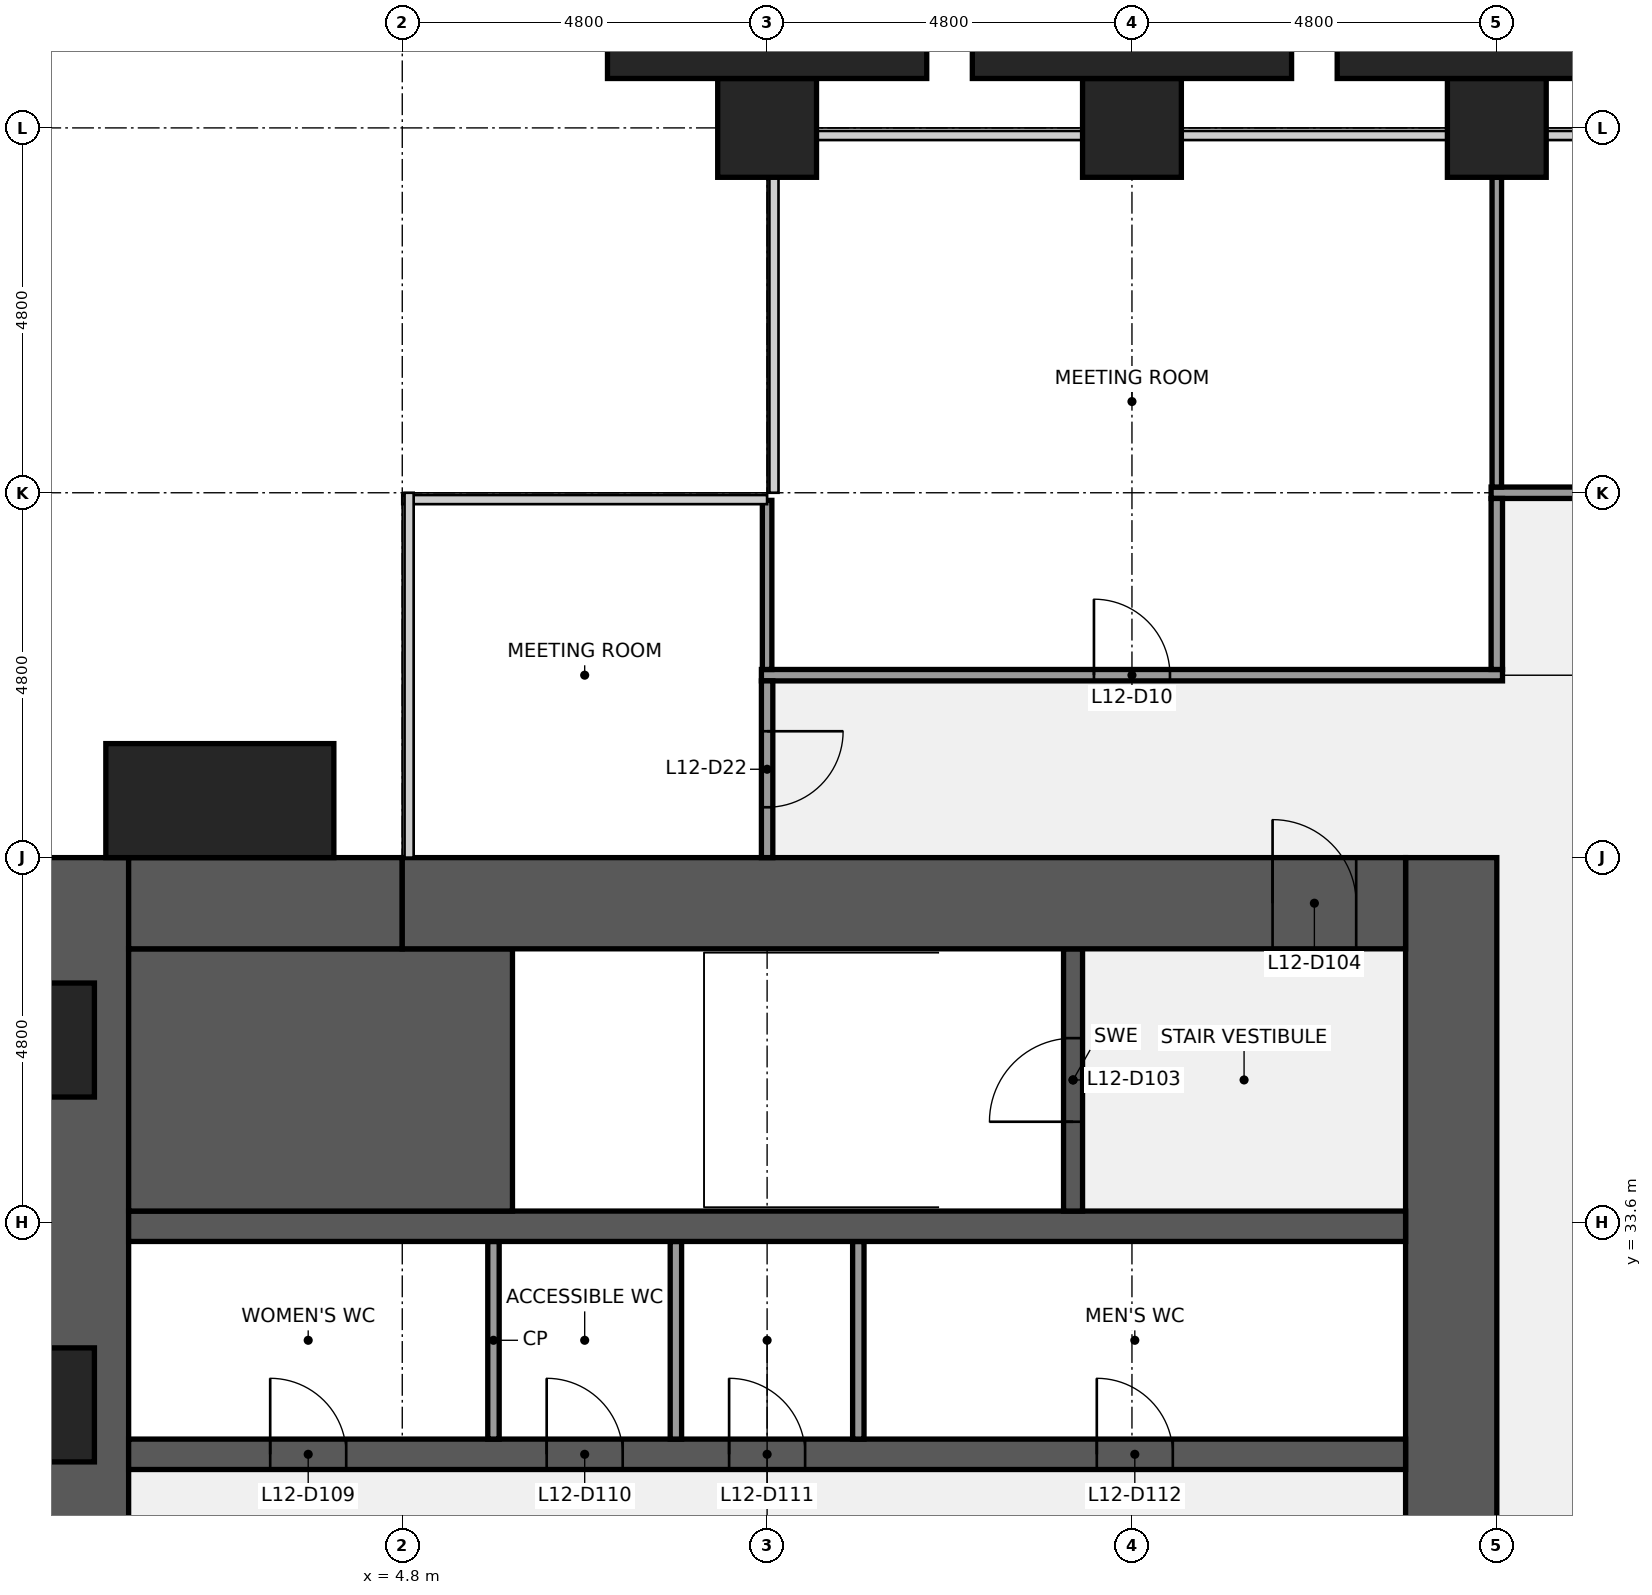
"""IFC4 building model, lengths in metres.
Left out: names, types, materials, properties, quantities, classifications, styles, units other than length and angle.
Written with IfcOpenShell. Run it as: python <this file> out.ifc"""

import sys

from ifc_helpers import new_model, si_unit, direction, frame, frame_2d, origin, origin_2d, place, context, subcontext, project, spatial, rectangle, extrude, element, fill, save


model = new_model("IFC4")
c1 = context("Model", 3, precision=1e-05, world=origin(), true_north=direction((0.0, 1.0)))
c2 = subcontext(c1, "Body", "Model", "MODEL_VIEW")
j1 = project(units=[si_unit("LENGTHUNIT", "METRE"), si_unit("PLANEANGLEUNIT", "RADIAN")], contexts=[c1])
p1 = place(None, origin())
s1 = spatial("IfcSite", under=j1, at=p1, CompositionType="ELEMENT")
p2 = place(p1, origin())
s2 = spatial("IfcBuilding", under=s1, at=p2, CompositionType="ELEMENT")
p3 = place(p2, frame((0.0, 0.0, 59.0)))
s3 = spatial("IfcBuildingStorey", under=s2, at=p3, CompositionType="ELEMENT", Elevation=59.0)
for number, where, z_axis, x_axis in (
    (1, (9.6, 48.0, 0.0), (0.0, 0.0, 1.0), (1.0, 0.0, 0.0)),
    (2, (14.4, 48.0, 0.0), (0.0, 0.0, 1.0), (1.0, 0.0, 0.0)),
    (3, (19.2, 48.0, 0.0), (0.0, 0.0, 1.0), (1.0, 0.0, 0.0)),
):
    element("IfcColumn", number, at=place(p3, frame(where, z_axis=z_axis, x_axis=x_axis)), inside=s3, PredefinedType="COLUMN", context=c2, shape_type="SweptSolid", body=[
        extrude(rectangle(XDim=1.3, YDim=1.3, at=origin_2d()), origin(), (0.0, 0.0, 1.0), 4.0),
    ])
p4 = place(p3, frame((0.6, 9.6, 0.0), z_axis=(0.0, 0.0, 1.0), x_axis=(0.0, 1.0, 0.0)))
e4 = element("IfcWall", 4, at=p4, inside=s3, PredefinedType="SHEAR", context=c2, shape_type="SweptSolid", body=[
    extrude(rectangle(XDim=28.8, YDim=1.2, at=frame_2d((14.4, 0.0))), origin(), (0.0, 0.0, 1.0), 3.84),
])
p5 = place(p4, frame((8.85, 0.0, 0.9)))
e5 = element("IfcOpeningElement", 5, at=p5, cuts=e4, PredefinedType="OPENING", context=c2, shape_type="SweptSolid", body=[
    extrude(rectangle(XDim=1.5, YDim=1.5, at=frame_2d((0.75, 0.75))), frame((0.0, 0.61, 0.0), z_axis=(0.0, -1.0, 0.0), x_axis=(1.0, 0.0, 0.0)), (0.0, 0.0, 1.0), 1.22),
])
p6 = place(p4, frame((18.45, 0.0, 0.9)))
e6 = element("IfcOpeningElement", 6, at=p6, cuts=e4, PredefinedType="OPENING", context=c2, shape_type="SweptSolid", body=[
    extrude(rectangle(XDim=1.5, YDim=1.5, at=frame_2d((0.75, 0.75))), frame((0.0, 0.61, 0.0), z_axis=(0.0, -1.0, 0.0), x_axis=(1.0, 0.0, 0.0)), (0.0, 0.0, 1.0), 1.22),
])
p7 = place(p3, frame((18.6, 38.4, 0.0), z_axis=(0.0, 0.0, 1.0), x_axis=(0.0, -1.0, 0.0)))
e7 = element("IfcWall", 7, at=p7, inside=s3, PredefinedType="SHEAR", context=c2, shape_type="SweptSolid", body=[
    extrude(rectangle(XDim=28.8, YDim=1.2, at=frame_2d((14.4, 0.0))), origin(), (0.0, 0.0, 1.0), 3.84),
])
p8 = place(p7, frame((18.3, 0.0, 0.0)))
e8 = element("IfcOpeningElement", 8, at=p8, cuts=e7, PredefinedType="OPENING", context=c2, shape_type="SweptSolid", body=[
    extrude(rectangle(XDim=1.8, YDim=2.1, at=frame_2d((0.9, 1.05))), frame((0.0, 0.61, 0.0), z_axis=(0.0, -1.0, 0.0), x_axis=(1.0, 0.0, 0.0)), (0.0, 0.0, 1.0), 1.22),
])
p9 = place(p7, frame((8.7, 0.0, 0.0)))
e9 = element("IfcOpeningElement", 9, at=p9, cuts=e7, PredefinedType="OPENING", context=c2, shape_type="SweptSolid", body=[
    extrude(rectangle(XDim=1.8, YDim=2.1, at=frame_2d((0.9, 1.05))), frame((0.0, 0.61, 0.0), z_axis=(0.0, -1.0, 0.0), x_axis=(1.0, 0.0, 0.0)), (0.0, 0.0, 1.0), 1.22),
])
p10 = place(p3, frame((1.2, 30.55, 0.0), z_axis=(0.0, 0.0, 1.0), x_axis=(1.0, 0.0, 0.0)))
e10 = element("IfcWall", 10, at=p10, inside=s3, PredefinedType="SHEAR", context=c2, shape_type="SweptSolid", body=[
    extrude(rectangle(XDim=16.8, YDim=0.4, at=frame_2d((8.4, 0.0))), origin(), (0.0, 0.0, 1.0), 3.84),
])
p11 = place(p10, frame((1.863, 0.0, 0.0)))
e11 = element("IfcOpeningElement", 11, at=p11, cuts=e10, PredefinedType="OPENING", context=c2, shape_type="SweptSolid", body=[
    extrude(rectangle(XDim=1.0, YDim=2.1, at=frame_2d((0.5, 1.05))), frame((0.0, 0.21, 0.0), z_axis=(0.0, -1.0, 0.0), x_axis=(1.0, 0.0, 0.0)), (0.0, 0.0, 1.0), 0.42),
])
p12 = place(p10, frame((5.5, 0.0, 0.0)))
e12 = element("IfcOpeningElement", 12, at=p12, cuts=e10, PredefinedType="OPENING", context=c2, shape_type="SweptSolid", body=[
    extrude(rectangle(XDim=1.0, YDim=2.1, at=frame_2d((0.5, 1.05))), frame((0.0, 0.21, 0.0), z_axis=(0.0, -1.0, 0.0), x_axis=(1.0, 0.0, 0.0)), (0.0, 0.0, 1.0), 0.42),
])
p13 = place(p10, frame((7.9, 0.0, 0.0)))
e13 = element("IfcOpeningElement", 13, at=p13, cuts=e10, PredefinedType="OPENING", context=c2, shape_type="SweptSolid", body=[
    extrude(rectangle(XDim=1.0, YDim=2.1, at=frame_2d((0.5, 1.05))), frame((0.0, 0.21, 0.0), z_axis=(0.0, -1.0, 0.0), x_axis=(1.0, 0.0, 0.0)), (0.0, 0.0, 1.0), 0.42),
])
p14 = place(p10, frame((12.738, 0.0, 0.0)))
e14 = element("IfcOpeningElement", 14, at=p14, cuts=e10, PredefinedType="OPENING", context=c2, shape_type="SweptSolid", body=[
    extrude(rectangle(XDim=1.0, YDim=2.1, at=frame_2d((0.5, 1.05))), frame((0.0, 0.21, 0.0), z_axis=(0.0, -1.0, 0.0), x_axis=(1.0, 0.0, 0.0)), (0.0, 0.0, 1.0), 0.42),
])
for number, where, z_axis, x_axis in (
    (15, (6.0, 30.75, 0.0), (0.0, 0.0, 1.0), (0.0, 1.0, 0.0)),
    (16, (8.4, 30.75, 0.0), (0.0, 0.0, 1.0), (0.0, 1.0, 0.0)),
    (17, (10.8, 30.75, 0.0), (0.0, 0.0, 1.0), (0.0, 1.0, 0.0)),
):
    element("IfcWall", number, at=place(p3, frame(where, z_axis=z_axis, x_axis=x_axis)), inside=s3, PredefinedType="PARTITIONING", context=c2, shape_type="SweptSolid", body=[
        extrude(rectangle(XDim=2.6, YDim=0.15, at=frame_2d((1.3, 0.0))), origin(), (0.0, 0.0, 1.0), 3.84),
    ])
p15 = place(p3, frame((1.2, 33.55, 0.0), z_axis=(0.0, 0.0, 1.0), x_axis=(1.0, 0.0, 0.0)))
e18 = element("IfcWall", 18, at=p15, inside=s3, PredefinedType="SHEAR", context=c2, shape_type="SweptSolid", body=[
    extrude(rectangle(XDim=16.8, YDim=0.4, at=frame_2d((8.4, 0.0))), origin(), (0.0, 0.0, 1.0), 3.84),
])
p16 = place(p3, frame((1.2, 35.475, 0.0), z_axis=(0.0, 0.0, 1.0), x_axis=(1.0, 0.0, 0.0)))
e19 = element("IfcWall", 19, at=p16, inside=s3, PredefinedType="SHEAR", context=c2, shape_type="SweptSolid", body=[
    extrude(rectangle(XDim=5.05, YDim=3.45, at=frame_2d((2.525, 0.0))), origin(), (0.0, 0.0, 1.0), 3.84),
])
p17 = place(p3, frame((13.625, 33.75, 0.0), z_axis=(0.0, 0.0, 1.0), x_axis=(0.0, 1.0, 0.0)))
e20 = element("IfcWall", 20, at=p17, inside=s3, PredefinedType="SHEAR", context=c2, shape_type="SweptSolid", body=[
    extrude(rectangle(XDim=3.45, YDim=0.25, at=frame_2d((1.725, 0.0))), origin(), (0.0, 0.0, 1.0), 3.84),
])
p18 = place(p17, frame((1.175, 0.0, 0.0)))
e21 = element("IfcOpeningElement", 21, at=p18, cuts=e20, PredefinedType="OPENING", context=c2, shape_type="SweptSolid", body=[
    extrude(rectangle(XDim=1.1, YDim=2.1, at=frame_2d((0.55, 1.05))), frame((0.0, 0.135, 0.0), z_axis=(0.0, -1.0, 0.0), x_axis=(1.0, 0.0, 0.0)), (0.0, 0.0, 1.0), 0.27),
])
p19 = place(p3, frame((1.2, 37.8, 0.0), z_axis=(0.0, 0.0, 1.0), x_axis=(1.0, 0.0, 0.0)))
e22 = element("IfcWall", 22, at=p19, inside=s3, PredefinedType="SHEAR", context=c2, shape_type="SweptSolid", body=[
    extrude(rectangle(XDim=3.6, YDim=1.2, at=frame_2d((1.8, 0.0))), origin(), (0.0, 0.0, 1.0), 3.84),
])
p20 = place(p3, frame((4.8, 37.8, 0.0), z_axis=(0.0, 0.0, 1.0), x_axis=(1.0, 0.0, 0.0)))
e23 = element("IfcWall", 23, at=p20, inside=s3, PredefinedType="SHEAR", context=c2, shape_type="SweptSolid", body=[
    extrude(rectangle(XDim=13.2, YDim=1.2, at=frame_2d((6.6, 0.0))), origin(), (0.0, 0.0, 1.0), 3.84),
])
p21 = place(p20, frame((11.45, 0.0, 0.0)))
e24 = element("IfcOpeningElement", 24, at=p21, cuts=e23, PredefinedType="OPENING", context=c2, shape_type="SweptSolid", body=[
    extrude(rectangle(XDim=1.1, YDim=2.1, at=frame_2d((0.55, 1.05))), frame((0.0, 0.61, 0.0), z_axis=(0.0, -1.0, 0.0), x_axis=(1.0, 0.0, 0.0)), (0.0, 0.0, 1.0), 1.22),
])
p22 = place(p3, frame((9.525, 40.8, 0.0), z_axis=(0.0, 0.0, 1.0), x_axis=(1.0, 0.0, 0.0)))
e25 = element("IfcWall", 25, at=p22, inside=s3, PredefinedType="PARTITIONING", context=c2, shape_type="SweptSolid", body=[
    extrude(rectangle(XDim=9.75, YDim=0.15, at=frame_2d((4.875, 0.0))), origin(), (0.0, 0.0, 1.0), 2.87),
])
p23 = place(p22, frame((4.375, 0.0, 0.0)))
e26 = element("IfcOpeningElement", 26, at=p23, cuts=e25, PredefinedType="OPENING", context=c2, shape_type="SweptSolid", body=[
    extrude(rectangle(XDim=1.0, YDim=2.1, at=frame_2d((0.5, 1.05))), frame((0.0, 0.085, 0.0), z_axis=(0.0, -1.0, 0.0), x_axis=(1.0, 0.0, 0.0)), (0.0, 0.0, 1.0), 0.17),
])
p24 = place(p3, frame((19.125, 43.2, 0.0), z_axis=(0.0, 0.0, 1.0), x_axis=(1.0, 0.0, 0.0)))
e27 = element("IfcWall", 27, at=p24, inside=s3, PredefinedType="PARTITIONING", context=c2, shape_type="SweptSolid", body=[
    extrude(rectangle(XDim=19.35, YDim=0.15, at=frame_2d((9.675, 0.0))), origin(), (0.0, 0.0, 1.0), 2.87),
])
p25 = place(p24, frame((4.375, 0.0, 0.0)))
e28 = element("IfcOpeningElement", 28, at=p25, cuts=e27, PredefinedType="OPENING", context=c2, shape_type="SweptSolid", body=[
    extrude(rectangle(XDim=1.0, YDim=2.1, at=frame_2d((0.5, 1.05))), frame((0.0, 0.085, 0.0), z_axis=(0.0, -1.0, 0.0), x_axis=(1.0, 0.0, 0.0)), (0.0, 0.0, 1.0), 0.17),
])
p26 = place(p24, frame((10.375, 0.0, 0.0)))
e29 = element("IfcOpeningElement", 29, at=p26, cuts=e27, PredefinedType="OPENING", context=c2, shape_type="SweptSolid", body=[
    extrude(rectangle(XDim=1.0, YDim=2.1, at=frame_2d((0.5, 1.05))), frame((0.0, 0.085, 0.0), z_axis=(0.0, -1.0, 0.0), x_axis=(1.0, 0.0, 0.0)), (0.0, 0.0, 1.0), 0.17),
])
p27 = place(p24, frame((13.975, 0.0, 0.0)))
e30 = element("IfcOpeningElement", 30, at=p27, cuts=e27, PredefinedType="OPENING", context=c2, shape_type="SweptSolid", body=[
    extrude(rectangle(XDim=1.0, YDim=2.1, at=frame_2d((0.5, 1.05))), frame((0.0, 0.085, 0.0), z_axis=(0.0, -1.0, 0.0), x_axis=(1.0, 0.0, 0.0)), (0.0, 0.0, 1.0), 0.17),
])
p28 = place(p24, frame((17.575, 0.0, 0.0)))
e31 = element("IfcOpeningElement", 31, at=p28, cuts=e27, PredefinedType="OPENING", context=c2, shape_type="SweptSolid", body=[
    extrude(rectangle(XDim=1.0, YDim=2.1, at=frame_2d((0.5, 1.05))), frame((0.0, 0.085, 0.0), z_axis=(0.0, -1.0, 0.0), x_axis=(1.0, 0.0, 0.0)), (0.0, 0.0, 1.0), 0.17),
])
p29 = place(p3, frame((9.6, 40.875, 0.0), z_axis=(0.0, 0.0, 1.0), x_axis=(0.0, 1.0, 0.0)))
e32 = element("IfcWall", 32, at=p29, inside=s3, PredefinedType="PARTITIONING", context=c2, shape_type="SweptSolid", body=[
    extrude(rectangle(XDim=2.225, YDim=0.125, at=frame_2d((1.113, 0.0))), origin(), (0.0, 0.0, 1.0), 2.87),
])
p30 = place(p3, frame((9.6, 38.4, 0.0), z_axis=(0.0, 0.0, 1.0), x_axis=(0.0, 1.0, 0.0)))
e33 = element("IfcWall", 33, at=p30, inside=s3, PredefinedType="PARTITIONING", context=c2, shape_type="SweptSolid", body=[
    extrude(rectangle(XDim=2.325, YDim=0.15, at=frame_2d((1.163, 0.0))), origin(), (0.0, 0.0, 1.0), 2.87),
])
p31 = place(p30, frame((0.663, 0.0, 0.0)))
e34 = element("IfcOpeningElement", 34, at=p31, cuts=e33, PredefinedType="OPENING", context=c2, shape_type="SweptSolid", body=[
    extrude(rectangle(XDim=1.0, YDim=2.1, at=frame_2d((0.5, 1.05))), frame((0.0, 0.085, 0.0), z_axis=(0.0, -1.0, 0.0), x_axis=(1.0, 0.0, 0.0)), (0.0, 0.0, 1.0), 0.17),
])
p32 = place(p3, frame((19.2, 43.275, 0.0), z_axis=(0.0, 0.0, 1.0), x_axis=(0.0, 1.0, 0.0)))
e35 = element("IfcWall", 35, at=p32, inside=s3, PredefinedType="PARTITIONING", context=c2, shape_type="SweptSolid", body=[
    extrude(rectangle(XDim=4.075, YDim=0.125, at=frame_2d((2.038, 0.0))), origin(), (0.0, 0.0, 1.0), 2.87),
])
p33 = place(p3, frame((19.2, 40.875, 0.0), z_axis=(0.0, 0.0, 1.0), x_axis=(0.0, 1.0, 0.0)))
e36 = element("IfcWall", 36, at=p33, inside=s3, PredefinedType="PARTITIONING", context=c2, shape_type="SweptSolid", body=[
    extrude(rectangle(XDim=2.25, YDim=0.15, at=frame_2d((1.125, 0.0))), origin(), (0.0, 0.0, 1.0), 2.87),
])
p34 = place(p3, frame((2.4, 39.15, 0.0), z_axis=(0.0, 0.0, 1.0), x_axis=(1.0, 0.0, 0.0)))
e37 = element("IfcColumn", 37, at=p34, inside=s3, PredefinedType="PILASTER", context=c2, shape_type="SweptSolid", body=[
    extrude(rectangle(XDim=3.0, YDim=1.5, at=origin_2d()), origin(), (0.0, 0.0, 1.0), 4.0),
])
for number, where, z_axis, x_axis in (
    (38, (9.6, 49.075, 0.0), (0.0, 0.0, 1.0), (1.0, 0.0, 0.0)),
    (39, (14.4, 49.075, 0.0), (0.0, 0.0, 1.0), (1.0, 0.0, 0.0)),
    (40, (19.2, 49.075, 0.0), (0.0, 0.0, 1.0), (1.0, 0.0, 0.0)),
):
    element("IfcColumn", number, at=place(p3, frame(where, z_axis=z_axis, x_axis=x_axis)), inside=s3, PredefinedType="PILASTER", context=c2, shape_type="SweptSolid", body=[
        extrude(rectangle(XDim=4.2, YDim=0.85, at=origin_2d()), origin(), (0.0, 0.0, 1.0), 4.0),
    ])
p35 = place(p18, origin())
e41 = element("IfcDoor", 41, at=p35, inside=s3, OperationType="SINGLE_SWING_LEFT", PredefinedType="DOOR", context=c2, shape_type="SweptSolid", body=[
    extrude(rectangle(XDim=1.1, YDim=2.1, at=frame_2d((0.55, 1.05))), frame((0.0, 0.025, 0.0), z_axis=(0.0, -1.0, 0.0), x_axis=(1.0, 0.0, 0.0)), (0.0, 0.0, 1.0), 0.05),
])
fill(e21, e41)
p36 = place(p21, origin())
e42 = element("IfcDoor", 42, at=p36, inside=s3, OperationType="SINGLE_SWING_LEFT", PredefinedType="DOOR", context=c2, shape_type="SweptSolid", body=[
    extrude(rectangle(XDim=1.1, YDim=2.1, at=frame_2d((0.55, 1.05))), frame((0.0, 0.025, 0.0), z_axis=(0.0, -1.0, 0.0), x_axis=(1.0, 0.0, 0.0)), (0.0, 0.0, 1.0), 0.05),
])
fill(e24, e42)
p37 = place(p11, origin())
e43 = element("IfcDoor", 43, at=p37, inside=s3, OperationType="SINGLE_SWING_LEFT", PredefinedType="DOOR", context=c2, shape_type="SweptSolid", body=[
    extrude(rectangle(XDim=1.0, YDim=2.1, at=frame_2d((0.5, 1.05))), frame((0.0, 0.025, 0.0), z_axis=(0.0, -1.0, 0.0), x_axis=(1.0, 0.0, 0.0)), (0.0, 0.0, 1.0), 0.05),
])
fill(e11, e43)
p38 = place(p12, origin())
e44 = element("IfcDoor", 44, at=p38, inside=s3, OperationType="SINGLE_SWING_LEFT", PredefinedType="DOOR", context=c2, shape_type="SweptSolid", body=[
    extrude(rectangle(XDim=1.0, YDim=2.1, at=frame_2d((0.5, 1.05))), frame((0.0, 0.025, 0.0), z_axis=(0.0, -1.0, 0.0), x_axis=(1.0, 0.0, 0.0)), (0.0, 0.0, 1.0), 0.05),
])
fill(e12, e44)
p39 = place(p13, origin())
e45 = element("IfcDoor", 45, at=p39, inside=s3, OperationType="SINGLE_SWING_LEFT", PredefinedType="DOOR", context=c2, shape_type="SweptSolid", body=[
    extrude(rectangle(XDim=1.0, YDim=2.1, at=frame_2d((0.5, 1.05))), frame((0.0, 0.025, 0.0), z_axis=(0.0, -1.0, 0.0), x_axis=(1.0, 0.0, 0.0)), (0.0, 0.0, 1.0), 0.05),
])
fill(e13, e45)
p40 = place(p14, origin())
e46 = element("IfcDoor", 46, at=p40, inside=s3, OperationType="SINGLE_SWING_LEFT", PredefinedType="DOOR", context=c2, shape_type="SweptSolid", body=[
    extrude(rectangle(XDim=1.0, YDim=2.1, at=frame_2d((0.5, 1.05))), frame((0.0, 0.025, 0.0), z_axis=(0.0, -1.0, 0.0), x_axis=(1.0, 0.0, 0.0)), (0.0, 0.0, 1.0), 0.05),
])
fill(e14, e46)
p41 = place(p23, origin())
e47 = element("IfcDoor", 47, at=p41, inside=s3, OperationType="SINGLE_SWING_LEFT", PredefinedType="DOOR", context=c2, shape_type="SweptSolid", body=[
    extrude(rectangle(XDim=1.0, YDim=2.1, at=frame_2d((0.5, 1.05))), frame((0.0, 0.025, 0.0), z_axis=(0.0, -1.0, 0.0), x_axis=(1.0, 0.0, 0.0)), (0.0, 0.0, 1.0), 0.05),
])
fill(e26, e47)
p42 = place(p31, origin())
e48 = element("IfcDoor", 48, at=p42, inside=s3, OperationType="SINGLE_SWING_RIGHT", PredefinedType="DOOR", context=c2, shape_type="SweptSolid", body=[
    extrude(rectangle(XDim=1.0, YDim=2.1, at=frame_2d((0.5, 1.05))), frame((0.0, 0.025, 0.0), z_axis=(0.0, -1.0, 0.0), x_axis=(1.0, 0.0, 0.0)), (0.0, 0.0, 1.0), 0.05),
])
fill(e34, e48)
save(model, sys.argv[1])
